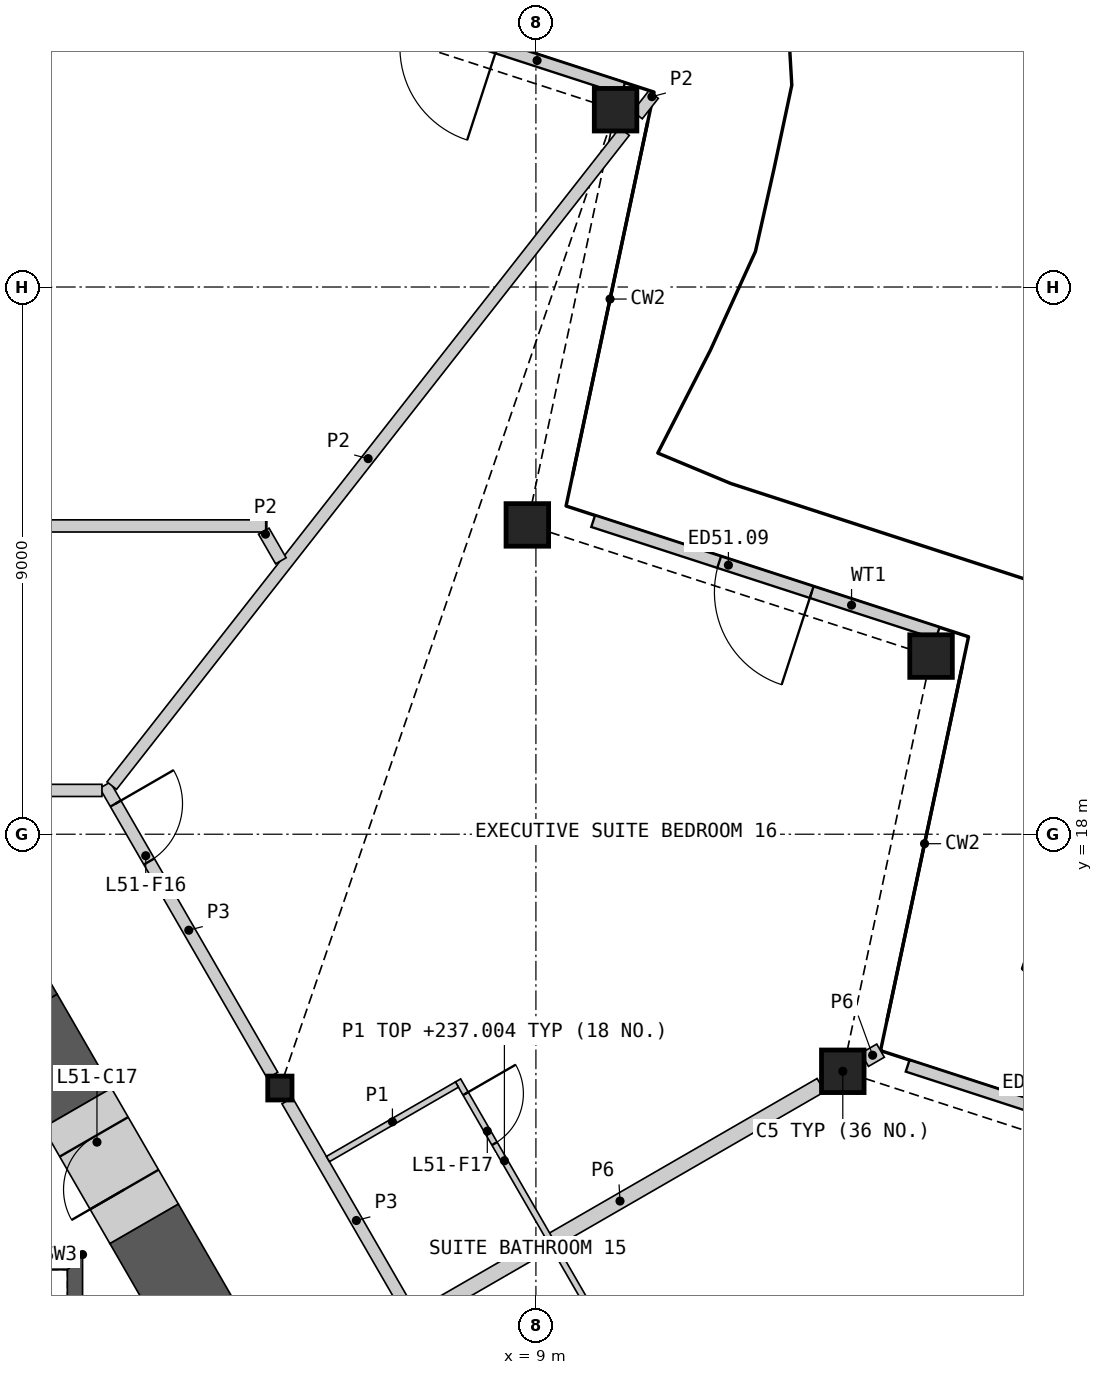
"""IFC4 building model, lengths in metres.
Left out: names, types, materials, properties, quantities, classifications, styles, units other than length and angle.
Written with IfcOpenShell. Run it as: python <this file> out.ifc"""

import sys

from ifc_helpers import new_model, si_unit, direction, frame, frame_2d, origin, origin_2d, place, context, subcontext, project, spatial, polyline, rectangle, hollow_rectangle, i_section, outline, extrude, element, fill, save


model = new_model("IFC4")
c1 = context("Model", 3, precision=1e-05, world=origin(), true_north=direction((0.0, 1.0)))
c2 = subcontext(c1, "Body", "Model", "MODEL_VIEW")
j1 = project(units=[si_unit("LENGTHUNIT", "METRE"), si_unit("PLANEANGLEUNIT", "RADIAN")], contexts=[c1])
p1 = place(None, origin())
s1 = spatial("IfcSite", under=j1, at=p1, CompositionType="ELEMENT")
p2 = place(p1, origin())
s2 = spatial("IfcBuilding", under=s1, at=p2, CompositionType="ELEMENT")
p3 = place(p2, frame((0.0, 0.0, 234.6)))
s3 = spatial("IfcBuildingStorey", under=s2, at=p3, CompositionType="ELEMENT", Elevation=234.6)
for number, where, z_axis, x_axis in (
    (1, (14.047, 14.101, 0.0), (0.0, 0.0, 1.0), (1.0, 0.0, 0.0)),
    (2, (15.499, 20.93, 0.0), (0.0, 0.0, 1.0), (1.0, 0.0, 0.0)),
    (3, (8.859, 23.087, 0.0), (0.0, 0.0, 1.0), (1.0, 0.0, 0.0)),
    (4, (10.31, 29.916, 0.0), (0.0, 0.0, 1.0), (1.0, 0.0, 0.0)),
):
    element("IfcColumn", number, at=place(p3, frame(where, z_axis=z_axis, x_axis=x_axis)), inside=s3, PredefinedType="COLUMN", context=c2, shape_type="SweptSolid", body=[
        extrude(hollow_rectangle(XDim=0.7, YDim=0.7, WallThickness=0.045, at=origin_2d()), origin(), (0.0, 0.0, 1.0), 3.6),
    ])
p4 = place(p3, frame((4.789, 13.825, 0.0), z_axis=(0.0, 0.0, 1.0), x_axis=(1.0, 0.0, 0.0)))
e5 = element("IfcColumn", 5, at=p4, inside=s3, PredefinedType="COLUMN", context=c2, shape_type="SweptSolid", body=[
    extrude(i_section(OverallWidth=0.399, OverallDepth=0.393, WebThickness=0.023, FlangeThickness=0.037, at=origin_2d()), origin(), (0.0, 0.0, 1.0), 3.6),
])
p5 = place(p3, frame((20.779, 12.35, 0.0), z_axis=(0.0, 0.0, 1.0), x_axis=(-0.951065383831, 0.308989701572, 0.0)))
e6 = element("IfcWall", 6, at=p5, inside=s3, PredefinedType="SOLIDWALL", context=c2, shape_type="SweptSolid", body=[
    extrude(rectangle(XDim=5.958, YDim=0.2, at=frame_2d((2.979, 0.0))), origin(), (0.0, 0.0, 1.0), 2.701),
])
p6 = place(p5, frame((2.179, 0.0, 0.0)))
e7 = element("IfcOpeningElement", 7, at=p6, cuts=e6, PredefinedType="OPENING", context=c2, shape_type="SweptSolid", body=[
    extrude(rectangle(XDim=1.6, YDim=2.4, at=frame_2d((0.8, 1.2))), frame((0.0, 0.11, 0.0), z_axis=(0.0, -1.0, 0.0), x_axis=(1.0, 0.0, 0.0)), (0.0, 0.0, 1.0), 0.22),
])
p7 = place(p3, frame((15.607, 21.308, 0.0), z_axis=(0.0, 0.0, 1.0), x_axis=(-0.951065383831, 0.308989701572, 0.0)))
e8 = element("IfcWall", 8, at=p7, inside=s3, PredefinedType="SOLIDWALL", context=c2, shape_type="SweptSolid", body=[
    extrude(rectangle(XDim=5.958, YDim=0.2, at=frame_2d((2.979, 0.0))), origin(), (0.0, 0.0, 1.0), 2.701),
])
p8 = place(p7, frame((2.179, 0.0, 0.0)))
e9 = element("IfcOpeningElement", 9, at=p8, cuts=e8, PredefinedType="OPENING", context=c2, shape_type="SweptSolid", body=[
    extrude(rectangle(XDim=1.6, YDim=2.4, at=frame_2d((0.8, 1.2))), frame((0.0, 0.11, 0.0), z_axis=(0.0, -1.0, 0.0), x_axis=(1.0, 0.0, 0.0)), (0.0, 0.0, 1.0), 0.22),
])
p9 = place(p3, frame((10.435, 30.266, 0.0), z_axis=(0.0, 0.0, 1.0), x_axis=(-0.951061471046, 0.309001744805, 0.0)))
e10 = element("IfcWall", 10, at=p9, inside=s3, PredefinedType="SOLIDWALL", context=c2, shape_type="SweptSolid", body=[
    extrude(rectangle(XDim=5.957, YDim=0.2, at=frame_2d((2.979, 0.0))), origin(), (0.0, 0.0, 1.0), 2.701),
])
p10 = place(p9, frame((2.179, 0.0, 0.0)))
e11 = element("IfcOpeningElement", 11, at=p10, cuts=e10, PredefinedType="OPENING", context=c2, shape_type="SweptSolid", body=[
    extrude(rectangle(XDim=1.6, YDim=2.4, at=frame_2d((0.8, 1.2))), frame((0.0, 0.11, 0.0), z_axis=(0.0, -1.0, 0.0), x_axis=(1.0, 0.0, 0.0)), (0.0, 0.0, 1.0), 0.22),
])
p11 = place(p3, origin())
e12 = element("IfcWall", 12, at=p11, inside=s3, PredefinedType="SHEAR", context=c2, shape_type="SweptSolid", body=[
    extrude(outline(polyline([(1.544, 5.237), (1.544, 11.087), (1.294, 10.837), (1.294, 5.237), (1.544, 5.237)])), origin(), (0.0, 0.0, 1.0), 3.25),
])
p12 = place(p3, origin())
e13 = element("IfcWall", 13, at=p12, inside=s3, PredefinedType="SHEAR", context=c2, shape_type="SweptSolid", body=[
    extrude(outline(polyline([(1.544, 11.087), (-1.544, 11.087), (-1.294, 10.837), (1.294, 10.837), (1.544, 11.087)])), origin(), (0.0, 0.0, 1.0), 3.25),
])
p13 = place(p3, frame((10.081, -1.441, 0.0), z_axis=(0.0, 0.0, 1.0), x_axis=(-0.500012180433, 0.866018371294, 0.0)))
e14 = element("IfcWall", 14, at=p13, inside=s3, PredefinedType="SHEAR", context=c2, shape_type="SweptSolid", body=[
    extrude(rectangle(XDim=15.05, YDim=1.3, at=frame_2d((7.525, 0.0))), origin(), (0.0, 0.0, 1.0), 3.25),
])
p14 = place(p3, frame((1.456, 13.499, 0.0), z_axis=(0.0, 0.0, 1.0), x_axis=(-0.499990639951, 0.866030807744, 0.0)))
e15 = element("IfcWall", 15, at=p14, inside=s3, PredefinedType="SHEAR", context=c2, shape_type="SweptSolid", body=[
    extrude(rectangle(XDim=1.786, YDim=1.3, at=frame_2d((0.893, 0.0))), origin(), (0.0, 0.0, 1.0), 3.25),
])
p15 = place(p3, origin())
e16 = element("IfcWall", 16, at=p15, inside=s3, PredefinedType="SHEAR", context=c2, shape_type="SweptSolid", body=[
    extrude(outline(polyline([(-1.126, 15.371), (0.0, 17.321), (1.126, 15.371), (0.0, 14.72), (-1.126, 15.371)])), origin(), (0.0, 0.0, 1.0), 3.25),
])
p16 = place(p3, frame((2.556, 11.593, 0.0), z_axis=(0.0, 0.0, 1.0), x_axis=(-0.499946605688, 0.86605622881, 0.0)))
e17 = element("IfcWall", 17, at=p16, inside=s3, PredefinedType="SHEAR", context=c2, shape_type="SweptSolid", body=[
    extrude(rectangle(XDim=2.2, YDim=1.3, at=frame_2d((1.1, 0.0))), origin(), (0.0, 0.0, 1.0), 3.25),
])
p17 = place(p16, frame((0.65, 0.0, 0.0)))
e18 = element("IfcOpeningElement", 18, at=p17, cuts=e17, PredefinedType="OPENING", context=c2, shape_type="SweptSolid", body=[
    extrude(rectangle(XDim=1.0, YDim=2.1, at=frame_2d((0.5, 1.05))), frame((0.0, 0.66, 0.0), z_axis=(0.0, -1.0, 0.0), x_axis=(1.0, 0.0, 0.0)), (0.0, 0.0, 1.0), 1.32),
])
p18 = place(p3, frame((4.91, 13.616, 0.0), z_axis=(0.0, 0.0, 1.0), x_axis=(0.50000207303, -0.866024206917, 0.0)))
e19 = element("IfcWall", 19, at=p18, inside=s3, PredefinedType="PARTITIONING", context=c2, shape_type="SweptSolid", body=[
    extrude(rectangle(XDim=9.095, YDim=0.2, at=frame_2d((4.547, 0.0))), origin(), (0.0, 0.0, 1.0), 3.25),
])
p19 = place(p3, frame((7.079, 10.059, 0.0), z_axis=(0.0, 0.0, 1.0), x_axis=(0.866033195618, 0.499986503906, 0.0)))
e20 = element("IfcWall", 20, at=p19, inside=s3, PredefinedType="PARTITIONING", context=c2, shape_type="SweptSolid", body=[
    extrude(rectangle(XDim=7.63, YDim=0.25, at=frame_2d((3.815, 0.0))), origin(), (0.0, 0.0, 1.0), 2.404),
])
p20 = place(p3, frame((1.913, 18.807, 0.0), z_axis=(0.0, 0.0, 1.0), x_axis=(0.499984524817, -0.866034338201, 0.0)))
e21 = element("IfcWall", 21, at=p20, inside=s3, PredefinedType="PARTITIONING", context=c2, shape_type="SweptSolid", body=[
    extrude(rectangle(XDim=5.51, YDim=0.2, at=frame_2d((2.755, 0.0))), origin(), (0.0, 0.0, 1.0), 3.25),
])
p21 = place(p20, frame((0.35, 0.0, 0.0)))
e22 = element("IfcOpeningElement", 22, at=p21, cuts=e21, PredefinedType="OPENING", context=c2, shape_type="SweptSolid", body=[
    extrude(rectangle(XDim=1.1, YDim=2.1, at=frame_2d((0.55, 1.05))), frame((0.0, 0.11, 0.0), z_axis=(0.0, -1.0, 0.0), x_axis=(1.0, 0.0, 0.0)), (0.0, 0.0, 1.0), 0.22),
])
p22 = place(p3, frame((-1.963, 18.72, 0.0), z_axis=(0.0, 0.0, 1.0), x_axis=(1.0, 0.0, 0.0)))
e23 = element("IfcWall", 23, at=p22, inside=s3, PredefinedType="PARTITIONING", context=c2, shape_type="SweptSolid", body=[
    extrude(rectangle(XDim=3.826, YDim=0.2, at=frame_2d((1.913, 0.0))), origin(), (0.0, 0.0, 1.0), 3.25),
])
p23 = place(p22, frame((1.49, 0.0, 0.0)))
e24 = element("IfcOpeningElement", 24, at=p23, cuts=e23, PredefinedType="OPENING", context=c2, shape_type="SweptSolid", body=[
    extrude(rectangle(XDim=0.95, YDim=2.1, at=frame_2d((0.475, 1.05))), frame((0.0, 0.11, 0.0), z_axis=(0.0, -1.0, 0.0), x_axis=(1.0, 0.0, 0.0)), (0.0, 0.0, 1.0), 0.22),
])
p24 = place(p3, frame((14.407, 14.29, 0.0), z_axis=(0.0, 0.0, 1.0), x_axis=(0.865888485494, 0.500237074485, 0.0)))
e25 = element("IfcWall", 25, at=p24, inside=s3, PredefinedType="PARTITIONING", context=c2, shape_type="SweptSolid", body=[
    extrude(rectangle(XDim=0.301, YDim=0.25, at=frame_2d((0.15, 0.0))), origin(), (0.0, 0.0, 1.0), 2.404),
])
p25 = place(p3, frame((2.025, 18.799, 0.0), z_axis=(0.0, 0.0, 1.0), x_axis=(0.616942368609, 0.787008331478, 0.0)))
e26 = element("IfcWall", 26, at=p25, inside=s3, PredefinedType="PARTITIONING", context=c2, shape_type="SweptSolid", body=[
    extrude(rectangle(XDim=13.668, YDim=0.2, at=frame_2d((6.834, 0.0))), origin(), (0.0, 0.0, 1.0), 2.404),
])
p26 = place(p3, frame((-7.428, 23.071, 0.0), z_axis=(0.0, 0.0, 1.0), x_axis=(1.0, 0.0, 0.0)))
e27 = element("IfcWall", 27, at=p26, inside=s3, PredefinedType="PARTITIONING", context=c2, shape_type="SweptSolid", body=[
    extrude(rectangle(XDim=12.002, YDim=0.2, at=frame_2d((6.001, 0.0))), origin(), (0.0, 0.0, 1.0), 2.404),
])
p27 = place(p26, frame((5.275, 0.0, 0.0)))
e28 = element("IfcOpeningElement", 28, at=p27, cuts=e27, PredefinedType="OPENING", context=c2, shape_type="SweptSolid", body=[
    extrude(rectangle(XDim=0.95, YDim=2.1, at=frame_2d((0.475, 1.05))), frame((0.0, 0.11, 0.0), z_axis=(0.0, -1.0, 0.0), x_axis=(1.0, 0.0, 0.0)), (0.0, 0.0, 1.0), 0.22),
])
p28 = place(p3, frame((4.524, 22.984, 0.0), z_axis=(0.0, 0.0, 1.0), x_axis=(0.500248658738, -0.865881792989, 0.0)))
e29 = element("IfcWall", 29, at=p28, inside=s3, PredefinedType="PARTITIONING", context=c2, shape_type="SweptSolid", body=[
    extrude(rectangle(XDim=0.562, YDim=0.2, at=frame_2d((0.281, 0.0))), origin(), (0.0, 0.0, 1.0), 2.404),
])
p29 = place(p3, frame((10.67, 29.828, 0.0), z_axis=(0.0, 0.0, 1.0), x_axis=(0.617216179113, 0.786793612227, 0.0)))
e30 = element("IfcWall", 30, at=p29, inside=s3, PredefinedType="PARTITIONING", context=c2, shape_type="SweptSolid", body=[
    extrude(rectangle(XDim=0.427, YDim=0.2, at=frame_2d((0.214, 0.0))), origin(), (0.0, 0.0, 1.0), 2.404),
])
p30 = place(p3, frame((7.719, 13.95, 0.0), z_axis=(0.0, 0.0, 1.0), x_axis=(0.500008851346, -0.866020293397, 0.0)))
e31 = element("IfcWall", 31, at=p30, inside=s3, PredefinedType="PARTITIONING", context=c2, shape_type="SweptSolid", body=[
    extrude(rectangle(XDim=6.1, YDim=0.1, at=frame_2d((3.05, 0.0))), origin(), (0.0, 0.0, 1.0), 2.404),
])
p31 = place(p30, frame((4.9, 0.0, 0.0)))
e32 = element("IfcOpeningElement", 32, at=p31, cuts=e31, PredefinedType="OPENING", context=c2, shape_type="SweptSolid", body=[
    extrude(rectangle(XDim=0.95, YDim=2.1, at=frame_2d((0.475, 1.05))), frame((0.0, 0.06, 0.0), z_axis=(0.0, -1.0, 0.0), x_axis=(1.0, 0.0, 0.0)), (0.0, 0.0, 1.0), 0.12),
])
p32 = place(p30, frame((0.25, 0.0, 0.0)))
e33 = element("IfcOpeningElement", 33, at=p32, cuts=e31, PredefinedType="OPENING", context=c2, shape_type="SweptSolid", body=[
    extrude(rectangle(XDim=0.95, YDim=2.1, at=frame_2d((0.475, 1.05))), frame((0.0, 0.06, 0.0), z_axis=(0.0, -1.0, 0.0), x_axis=(1.0, 0.0, 0.0)), (0.0, 0.0, 1.0), 0.12),
])
p33 = place(p3, frame((5.579, 12.657, 0.0), z_axis=(0.0, 0.0, 1.0), x_axis=(0.866057815567, 0.499943856944, 0.0)))
e34 = element("IfcWall", 34, at=p33, inside=s3, PredefinedType="PARTITIONING", context=c2, shape_type="SweptSolid", body=[
    extrude(rectangle(XDim=2.45, YDim=0.1, at=frame_2d((1.225, 0.0))), origin(), (0.0, 0.0, 1.0), 2.404),
])
p34 = place(p8, origin())
e35 = element("IfcDoor", 35, at=p34, inside=s3, OperationType="DOUBLE_DOOR_SINGLE_SWING", PredefinedType="DOOR", context=c2, shape_type="SweptSolid", body=[
    extrude(rectangle(XDim=1.6, YDim=2.4, at=frame_2d((0.8, 1.2))), frame((0.0, 0.025, 0.0), z_axis=(0.0, -1.0, 0.0), x_axis=(1.0, 0.0, 0.0)), (0.0, 0.0, 1.0), 0.05),
])
fill(e9, e35)
p35 = place(p17, origin())
e36 = element("IfcDoor", 36, at=p35, inside=s3, OperationType="SINGLE_SWING_LEFT", PredefinedType="DOOR", context=c2, shape_type="SweptSolid", body=[
    extrude(rectangle(XDim=1.0, YDim=2.1, at=frame_2d((0.5, 1.05))), frame((0.0, 0.405, 0.0), z_axis=(0.0, -1.0, 0.0), x_axis=(1.0, 0.0, 0.0)), (0.0, 0.0, 1.0), 0.05),
])
fill(e18, e36)
p36 = place(p21, origin())
e37 = element("IfcDoor", 37, at=p36, inside=s3, OperationType="SINGLE_SWING_LEFT", PredefinedType="DOOR", context=c2, shape_type="SweptSolid", body=[
    extrude(rectangle(XDim=1.1, YDim=2.1, at=frame_2d((0.55, 1.05))), frame((0.0, 0.025, 0.0), z_axis=(0.0, -1.0, 0.0), x_axis=(1.0, 0.0, 0.0)), (0.0, 0.0, 1.0), 0.05),
])
fill(e22, e37)
p37 = place(p32, origin())
e38 = element("IfcDoor", 38, at=p37, inside=s3, OperationType="SINGLE_SWING_LEFT", PredefinedType="DOOR", context=c2, shape_type="SweptSolid", body=[
    extrude(rectangle(XDim=0.95, YDim=2.1, at=frame_2d((0.475, 1.05))), frame((0.0, 0.025, 0.0), z_axis=(0.0, -1.0, 0.0), x_axis=(1.0, 0.0, 0.0)), (0.0, 0.0, 1.0), 0.05),
])
fill(e33, e38)
save(model, sys.argv[1])
